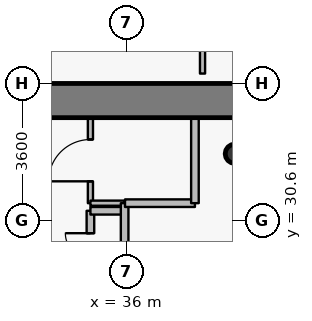
"""IFC4 building model, lengths in metres.
Left out: names, types, materials, properties, quantities, classifications, styles, units other than length and angle.
Written with IfcOpenShell. Run it as: python <this file> out.ifc"""

import sys

from ifc_helpers import new_model, si_unit, direction, frame, frame_2d, origin, origin_2d, place, context, subcontext, project, spatial, rectangle, hollow_circle, extrude, source, transform, mapped, element, fill, save


model = new_model("IFC4")
c1 = context("Model", 3, precision=1e-05, world=origin(), true_north=direction((0.0, 1.0)))
c2 = subcontext(c1, "Body", "Model", "MODEL_VIEW")
j1 = project(units=[si_unit("LENGTHUNIT", "METRE"), si_unit("PLANEANGLEUNIT", "RADIAN")], contexts=[c1])
p1 = place(None, origin())
s1 = spatial("IfcSite", under=j1, at=p1, CompositionType="ELEMENT")
p2 = place(p1, origin())
s2 = spatial("IfcBuilding", under=s1, at=p2, CompositionType="ELEMENT")
p3 = place(p2, frame((0.0, 0.0, 49.2)))
s3 = spatial("IfcBuildingStorey", under=s2, at=p3, CompositionType="ELEMENT", Elevation=49.2)
p4 = place(p3, frame((38.85, 32.35, 0.0), z_axis=(0.0, 0.0, 1.0), x_axis=(1.0, 0.0, 0.0)))
e1 = element("IfcColumn", 1, at=p4, inside=s3, PredefinedType="COLUMN", context=c2, shape_type="SweptSolid", body=[
    extrude(hollow_circle(Radius=0.254, WallThickness=0.02, at=origin_2d()), origin(), (0.0, 0.0, 1.0), 4.2),
])
p5 = place(p3, frame((26.75, 33.75, 0.0), z_axis=(0.0, 0.0, 1.0), x_axis=(1.0, 0.0, 0.0)))
e2 = element("IfcWall", 2, at=p5, inside=s3, PredefinedType="SHEAR", context=c2, shape_type="SweptSolid", body=[
    extrude(rectangle(XDim=18.5, YDim=0.9, at=frame_2d((9.25, 0.0))), origin(), (0.0, 0.0, 1.0), 3.4),
])
p6 = place(p3, frame((35.05, 27.25, 0.0), z_axis=(0.0, 0.0, 1.0), x_axis=(0.0, 1.0, 0.0)))
e3 = element("IfcWall", 3, at=p6, inside=s3, PredefinedType="PARTITIONING", context=c2, shape_type="SweptSolid", body=[
    extrude(rectangle(XDim=3.6, YDim=0.2, at=frame_2d((1.8, 0.0))), origin(), (0.0, 0.0, 1.0), 3.95),
])
p7 = place(p6, frame((0.59, 0.0, 0.0)))
e4 = element("IfcOpeningElement", 4, at=p7, cuts=e3, PredefinedType="OPENING", context=c2, shape_type="SweptSolid", body=[
    extrude(rectangle(XDim=0.66, YDim=2.05, at=origin_2d()), frame((0.33, 0.11, 1.025), z_axis=(0.0, -1.0, 0.0), x_axis=(1.0, 0.0, 0.0)), (0.0, 0.0, 1.0), 0.22),
])
p8 = place(p6, frame((2.35, 0.0, 0.0)))
e5 = element("IfcOpeningElement", 5, at=p8, cuts=e3, PredefinedType="OPENING", context=c2, shape_type="SweptSolid", body=[
    extrude(rectangle(XDim=0.66, YDim=2.05, at=origin_2d()), frame((0.33, 0.11, 1.025), z_axis=(0.0, -1.0, 0.0), x_axis=(1.0, 0.0, 0.0)), (0.0, 0.0, 1.0), 0.22),
])
p9 = place(p3, frame((35.05, 30.85, 0.0), z_axis=(0.0, 0.0, 1.0), x_axis=(1.0, 0.0, 0.0)))
e6 = element("IfcWall", 6, at=p9, inside=s3, PredefinedType="PARTITIONING", context=c2, shape_type="SweptSolid", body=[
    extrude(rectangle(XDim=0.9, YDim=0.2, at=frame_2d((0.45, 0.0))), origin(), (0.0, 0.0, 1.0), 3.95),
])
p10 = place(p3, frame((35.05, 31.05, 0.0), z_axis=(0.0, 0.0, 1.0), x_axis=(0.0, 1.0, 0.0)))
e7 = element("IfcWall", 7, at=p10, inside=s3, PredefinedType="PARTITIONING", context=c2, shape_type="SweptSolid", body=[
    extrude(rectangle(XDim=2.25, YDim=0.135, at=frame_2d((1.125, 0.0))), origin(), (0.0, 0.0, 1.0), 3.535),
])
p11 = place(p10, frame((0.575, 0.0, 0.0)))
e8 = element("IfcOpeningElement", 8, at=p11, cuts=e7, PredefinedType="OPENING", context=c2, shape_type="SweptSolid", body=[
    extrude(rectangle(XDim=1.1, YDim=2.15, at=origin_2d()), frame((0.55, 0.078, 1.075), z_axis=(0.0, -1.0, 0.0), x_axis=(1.0, 0.0, 0.0)), (0.0, 0.0, 1.0), 0.155),
])
p12 = place(p3, frame((35.05, 31.05, 0.0), z_axis=(0.0, 0.0, 1.0), x_axis=(1.0, 0.0, 0.0)))
e9 = element("IfcWall", 9, at=p12, inside=s3, PredefinedType="PARTITIONING", context=c2, shape_type="SweptSolid", body=[
    extrude(rectangle(XDim=0.9, YDim=0.135, at=frame_2d((0.45, 0.0))), origin(), (0.0, 0.0, 1.0), 3.95),
])
p13 = place(p3, frame((35.95, 27.25, 0.0), z_axis=(0.0, 0.0, 1.0), x_axis=(0.0, 1.0, 0.0)))
e10 = element("IfcWall", 10, at=p13, inside=s3, PredefinedType="PARTITIONING", context=c2, shape_type="SweptSolid", body=[
    extrude(rectangle(XDim=3.8, YDim=0.2, at=frame_2d((1.9, 0.0))), origin(), (0.0, 0.0, 1.0), 3.95),
])
p14 = place(p3, frame((35.96, 31.05, 0.0), z_axis=(0.0, 0.0, 1.0), x_axis=(1.0, 0.0, 0.0)))
e11 = element("IfcWall", 11, at=p14, inside=s3, PredefinedType="PARTITIONING", context=c2, shape_type="SweptSolid", body=[
    extrude(rectangle(XDim=1.84, YDim=0.2, at=frame_2d((0.92, 0.0))), origin(), (0.0, 0.0, 1.0), 3.95),
])
p15 = place(p3, frame((37.8, 31.05, 0.0), z_axis=(0.0, 0.0, 1.0), x_axis=(0.0, 1.0, 0.0)))
e12 = element("IfcWall", 12, at=p15, inside=s3, PredefinedType="PARTITIONING", context=c2, shape_type="SweptSolid", body=[
    extrude(rectangle(XDim=2.25, YDim=0.2, at=frame_2d((1.125, 0.0))), origin(), (0.0, 0.0, 1.0), 3.535),
])
p16 = place(p3, frame((38.0, 34.46, 0.0), z_axis=(0.0, 0.0, 1.0), x_axis=(0.0, 1.0, 0.0)))
e13 = element("IfcWall", 13, at=p16, inside=s3, PredefinedType="PARTITIONING", context=c2, shape_type="SweptSolid", body=[
    extrude(rectangle(XDim=1.64, YDim=0.135, at=frame_2d((0.82, 0.0))), origin(), (0.0, 0.0, 1.0), 3.95),
])
m1 = source(origin(), c2, "Body", "SweptSolid", [
    extrude(rectangle(XDim=0.66, YDim=2.05, at=origin_2d()), frame((0.33, 0.025, 1.025), z_axis=(0.0, -1.0, 0.0), x_axis=(1.0, 0.0, 0.0)), (0.0, 0.0, 1.0), 0.05),
])
p17 = place(p8, origin())
e14 = element("IfcDoor", 14, at=p17, inside=s3, OperationType="SINGLE_SWING_RIGHT", PredefinedType="USERDEFINED", context=c2, shape_type="MappedRepresentation", body=[
    mapped(m1, transform((0.0, 0.0, 0.0), x_axis=(1.0, 0.0, 0.0), y_axis=(0.0, 1.0, 0.0), z_axis=(0.0, 0.0, 1.0), scale=1.0)),
])
fill(e5, e14)
m2 = source(origin(), c2, "Body", "SweptSolid", [
    extrude(rectangle(XDim=1.1, YDim=2.15, at=origin_2d()), frame((0.55, 0.025, 1.075), z_axis=(0.0, -1.0, 0.0), x_axis=(1.0, 0.0, 0.0)), (0.0, 0.0, 1.0), 0.05),
])
p18 = place(p11, origin())
e15 = element("IfcDoor", 15, at=p18, inside=s3, OperationType="SINGLE_SWING_LEFT", PredefinedType="DOOR", context=c2, shape_type="MappedRepresentation", body=[
    mapped(m2, transform((0.0, 0.0, 0.0), x_axis=(1.0, 0.0, 0.0), y_axis=(0.0, 1.0, 0.0), z_axis=(0.0, 0.0, 1.0), scale=1.0)),
])
fill(e8, e15)
save(model, sys.argv[1])
